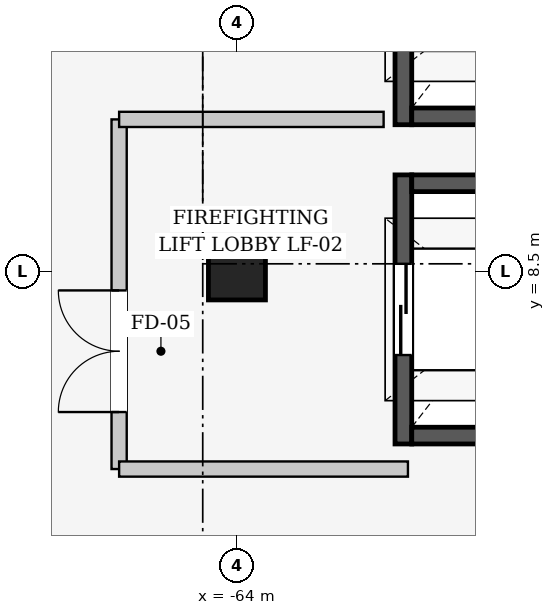
"""IFC4 building model, lengths in metres.
Left out: names, types, materials, properties, quantities, classifications, styles, units other than length and angle.
Written with IfcOpenShell. Run it as: python <this file> out.ifc"""

import sys

from ifc_helpers import new_model, si_unit, direction, frame, frame_2d, origin, origin_2d, place, context, subcontext, project, spatial, rectangle, extrude, element, fill, save


model = new_model("IFC4")
c1 = context("Model", 3, precision=1e-05, world=origin(), true_north=direction((0.0, 1.0)))
c2 = subcontext(c1, "Body", "Model", "MODEL_VIEW")
j1 = project(units=[si_unit("LENGTHUNIT", "METRE"), si_unit("PLANEANGLEUNIT", "RADIAN")], contexts=[c1])
p1 = place(None, origin())
s1 = spatial("IfcSite", under=j1, at=p1, CompositionType="ELEMENT")
p2 = place(p1, origin())
s2 = spatial("IfcBuilding", under=s1, at=p2, CompositionType="ELEMENT")
p3 = place(p2, frame((0.0, 0.0, 21.0)))
s3 = spatial("IfcBuildingStorey", under=s2, at=p3, CompositionType="ELEMENT", Elevation=21.0)
p4 = place(p3, frame((-64.0, 8.5, 0.0), z_axis=(0.0, 0.0, 1.0), x_axis=(1.0, 0.0, 0.0)))
e1 = element("IfcColumn", 1, at=p4, inside=s3, PredefinedType="COLUMN", context=c2, shape_type="SweptSolid", body=[
    extrude(rectangle(XDim=0.75, YDim=0.75, at=origin_2d()), origin(), (0.0, 0.0, 1.0), 5.4),
])
p5 = place(p3, frame((-61.81, 6.23, 0.0), z_axis=(0.0, 0.0, 1.0), x_axis=(0.0, 1.0, 0.0)))
e2 = element("IfcWall", 2, at=p5, inside=s3, PredefinedType="SHEAR", context=c2, shape_type="SweptSolid", body=[
    extrude(rectangle(XDim=3.54, YDim=0.22, at=frame_2d((1.77, 0.0))), origin(), (0.0, 0.0, 1.0), 5.4),
])
p6 = place(p5, frame((1.17, 0.0, 0.0)))
e3 = element("IfcOpeningElement", 3, at=p6, cuts=e2, PredefinedType="OPENING", context=c2, shape_type="SweptSolid", body=[
    extrude(rectangle(XDim=1.2, YDim=2.2, at=frame_2d((0.6, 1.1))), frame((0.0, 0.12, 0.0), z_axis=(0.0, -1.0, 0.0), x_axis=(1.0, 0.0, 0.0)), (0.0, 0.0, 1.0), 0.24),
])
for number, where, z_axis, x_axis in (
    (4, (-61.7, 9.66, 0.0), (0.0, 0.0, 1.0), (1.0, 0.0, 0.0)),
    (5, (-59.3, 6.34, 0.0), (0.0, 0.0, 1.0), (-1.0, 0.0, 0.0)),
):
    element("IfcWall", number, at=place(p3, frame(where, z_axis=z_axis, x_axis=x_axis)), inside=s3, PredefinedType="SHEAR", context=c2, shape_type="SweptSolid", body=[
        extrude(rectangle(XDim=2.4, YDim=0.22, at=frame_2d((1.2, 0.0))), origin(), (0.0, 0.0, 1.0), 5.4),
    ])
p7 = place(p3, frame((-61.81, 10.43, 0.0), z_axis=(0.0, 0.0, 1.0), x_axis=(0.0, 1.0, 0.0)))
e6 = element("IfcWall", 6, at=p7, inside=s3, PredefinedType="SHEAR", context=c2, shape_type="SweptSolid", body=[
    extrude(rectangle(XDim=3.54, YDim=0.22, at=frame_2d((1.77, 0.0))), origin(), (0.0, 0.0, 1.0), 5.4),
])
p8 = place(p7, frame((1.22, 0.0, 0.0)))
e7 = element("IfcOpeningElement", 7, at=p8, cuts=e6, PredefinedType="OPENING", context=c2, shape_type="SweptSolid", body=[
    extrude(rectangle(XDim=1.1, YDim=2.2, at=frame_2d((0.55, 1.1))), frame((0.0, 0.12, 0.0), z_axis=(0.0, -1.0, 0.0), x_axis=(1.0, 0.0, 0.0)), (0.0, 0.0, 1.0), 0.24),
])
p9 = place(p3, frame((-59.3, 10.54, 0.0), z_axis=(0.0, 0.0, 1.0), x_axis=(-1.0, 0.0, 0.0)))
e8 = element("IfcWall", 8, at=p9, inside=s3, PredefinedType="SHEAR", context=c2, shape_type="SweptSolid", body=[
    extrude(rectangle(XDim=2.4, YDim=0.22, at=frame_2d((1.2, 0.0))), origin(), (0.0, 0.0, 1.0), 5.4),
])
p10 = place(p3, frame((-65.55, 5.9, 0.0), z_axis=(0.0, 0.0, 1.0), x_axis=(0.0, 1.0, 0.0)))
e9 = element("IfcWall", 9, at=p10, inside=s3, PredefinedType="PARTITIONING", context=c2, shape_type="SweptSolid", body=[
    extrude(rectangle(XDim=4.6, YDim=0.2, at=frame_2d((2.3, 0.0))), origin(), (0.0, 0.0, 1.0), 4.145),
])
p11 = place(p10, frame((0.75, 0.0, 0.0)))
e10 = element("IfcOpeningElement", 10, at=p11, cuts=e9, PredefinedType="OPENING", context=c2, shape_type="SweptSolid", body=[
    extrude(rectangle(XDim=1.6, YDim=2.2, at=frame_2d((0.8, 1.1))), frame((0.0, 0.11, 0.0), z_axis=(0.0, -1.0, 0.0), x_axis=(1.0, 0.0, 0.0)), (0.0, 0.0, 1.0), 0.22),
])
p12 = place(p3, frame((-65.55, 10.5, 0.0), z_axis=(0.0, 0.0, 1.0), x_axis=(1.0, 0.0, 0.0)))
e11 = element("IfcWall", 11, at=p12, inside=s3, PredefinedType="PARTITIONING", context=c2, shape_type="SweptSolid", body=[
    extrude(rectangle(XDim=3.48, YDim=0.2, at=frame_2d((1.74, 0.0))), origin(), (0.0, 0.0, 1.0), 4.445),
])
p13 = place(p3, frame((-61.75, 5.9, 0.0), z_axis=(0.0, 0.0, 1.0), x_axis=(-1.0, 0.0, 0.0)))
e12 = element("IfcWall", 12, at=p13, inside=s3, PredefinedType="PARTITIONING", context=c2, shape_type="SweptSolid", body=[
    extrude(rectangle(XDim=3.8, YDim=0.2, at=frame_2d((1.9, 0.0))), origin(), (0.0, 0.0, 1.0), 4.445),
])
p14 = place(p6, origin())
e13 = element("IfcDoor", 13, at=p14, inside=s3, OperationType="SLIDING_TO_LEFT", PredefinedType="DOOR", context=c2, shape_type="SweptSolid", body=[
    extrude(rectangle(XDim=1.2, YDim=2.2, at=frame_2d((0.6, 1.1))), frame((0.0, 0.025, 0.0), z_axis=(0.0, -1.0, 0.0), x_axis=(1.0, 0.0, 0.0)), (0.0, 0.0, 1.0), 0.05),
])
fill(e3, e13)
p15 = place(p11, origin())
e14 = element("IfcDoor", 14, at=p15, inside=s3, OperationType="DOUBLE_DOOR_SINGLE_SWING", PredefinedType="DOOR", context=c2, shape_type="SweptSolid", body=[
    extrude(rectangle(XDim=1.6, YDim=2.2, at=frame_2d((0.8, 1.1))), frame((0.0, 0.025, 0.0), z_axis=(0.0, -1.0, 0.0), x_axis=(1.0, 0.0, 0.0)), (0.0, 0.0, 1.0), 0.05),
])
fill(e10, e14)
save(model, sys.argv[1])
